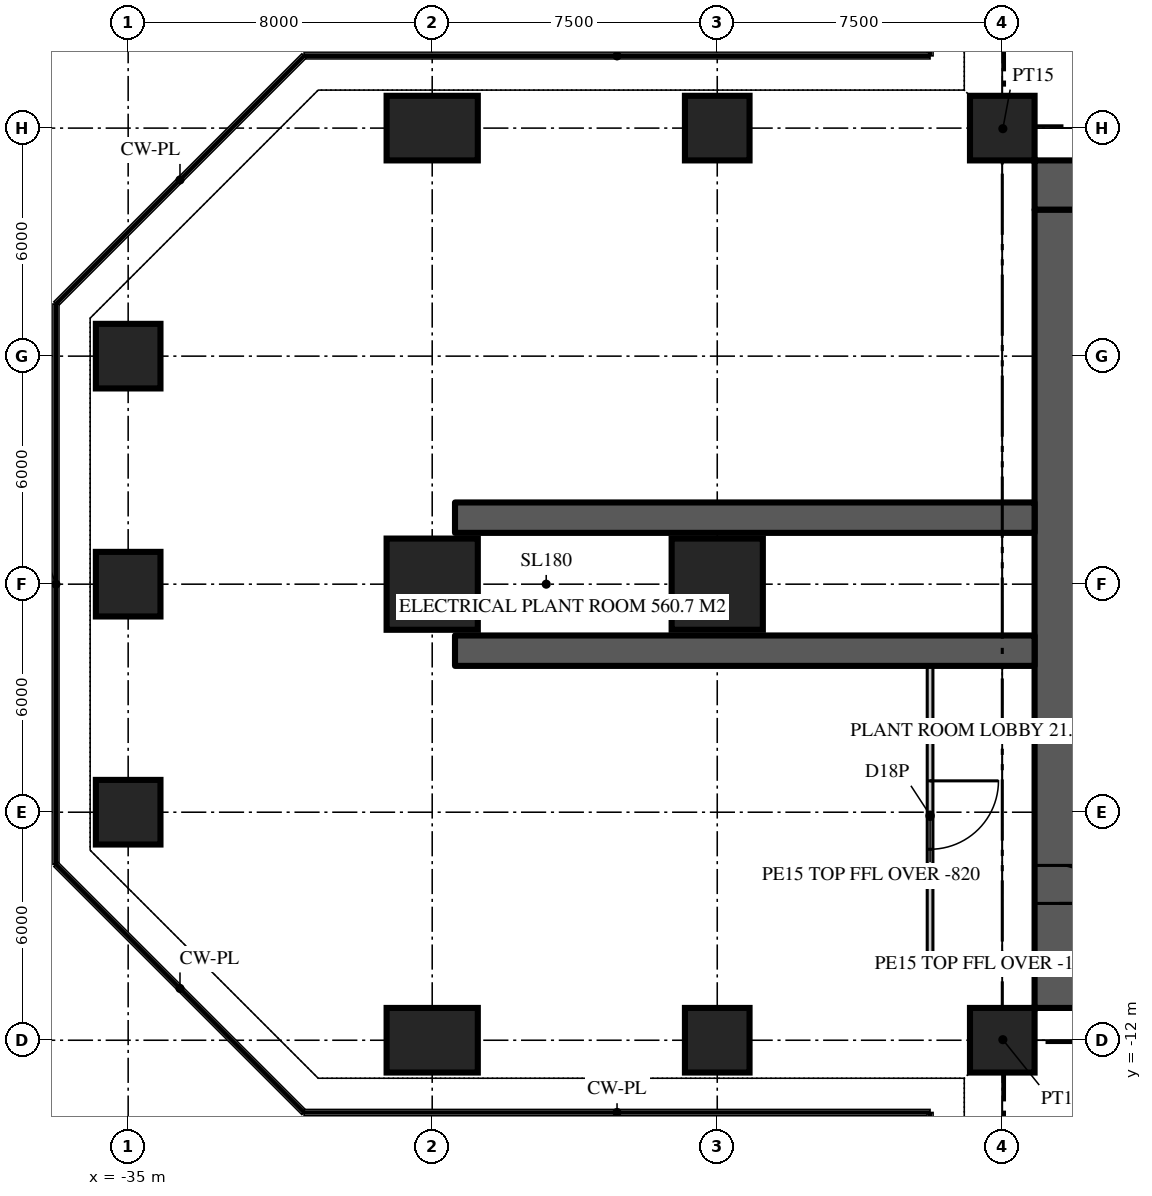
"""IFC4 building model, lengths in metres.
Left out: names, types, materials, properties, quantities, classifications, styles, units other than length and angle.
Written with IfcOpenShell. Run it as: python <this file> out.ifc"""

import sys

from ifc_helpers import new_model, si_unit, direction, frame, frame_2d, origin, origin_2d, place, context, subcontext, project, spatial, rectangle, extrude, element, fill, save


model = new_model("IFC4")
c1 = context("Model", 3, precision=1e-05, world=origin(), true_north=direction((0.0, 1.0)))
c2 = subcontext(c1, "Body", "Model", "MODEL_VIEW")
j1 = project(units=[si_unit("LENGTHUNIT", "METRE"), si_unit("PLANEANGLEUNIT", "RADIAN")], contexts=[c1])
p1 = place(None, origin())
s1 = spatial("IfcSite", under=j1, at=p1, CompositionType="ELEMENT")
p2 = place(p1, origin())
s2 = spatial("IfcBuilding", under=s1, at=p2, CompositionType="ELEMENT")
p3 = place(p2, frame((0.0, 0.0, 118.2)))
s3 = spatial("IfcBuildingStorey", under=s2, at=p3, CompositionType="ELEMENT", Elevation=118.2)
p4 = place(p3, frame((-11.15, 10.5, 0.0), z_axis=(0.0, 0.0, 1.0), x_axis=(1.0, 0.0, 0.0)))
e1 = element("IfcWall", 1, at=p4, inside=s3, PredefinedType="SHEAR", context=c2, shape_type="SweptSolid", body=[
    extrude(rectangle(XDim=22.3, YDim=1.3, at=frame_2d((11.15, 0.0))), origin(), (0.0, 0.0, 1.0), 6.0),
])
p5 = place(p4, frame((4.25, 0.0, 0.0)))
e2 = element("IfcOpeningElement", 2, at=p5, cuts=e1, PredefinedType="OPENING", context=c2, shape_type="SweptSolid", body=[
    extrude(rectangle(XDim=1.8, YDim=2.2, at=frame_2d((0.9, 1.1))), frame((0.0, 0.66, 0.0), z_axis=(0.0, -1.0, 0.0), x_axis=(1.0, 0.0, 0.0)), (0.0, 0.0, 1.0), 1.32),
])
p6 = place(p4, frame((16.25, 0.0, 0.0)))
e3 = element("IfcOpeningElement", 3, at=p6, cuts=e1, PredefinedType="OPENING", context=c2, shape_type="SweptSolid", body=[
    extrude(rectangle(XDim=1.8, YDim=2.2, at=frame_2d((0.9, 1.1))), frame((0.0, 0.66, 0.0), z_axis=(0.0, -1.0, 0.0), x_axis=(1.0, 0.0, 0.0)), (0.0, 0.0, 1.0), 1.32),
])
p7 = place(p3, frame((11.15, -10.5, 0.0), z_axis=(0.0, 0.0, 1.0), x_axis=(-1.0, 0.0, 0.0)))
e4 = element("IfcWall", 4, at=p7, inside=s3, PredefinedType="SHEAR", context=c2, shape_type="SweptSolid", body=[
    extrude(rectangle(XDim=22.3, YDim=1.3, at=frame_2d((11.15, 0.0))), origin(), (0.0, 0.0, 1.0), 6.0),
])
p8 = place(p7, frame((16.25, 0.0, 0.0)))
e5 = element("IfcOpeningElement", 5, at=p8, cuts=e4, PredefinedType="OPENING", context=c2, shape_type="SweptSolid", body=[
    extrude(rectangle(XDim=1.8, YDim=2.2, at=frame_2d((0.9, 1.1))), frame((0.0, 0.66, 0.0), z_axis=(0.0, -1.0, 0.0), x_axis=(1.0, 0.0, 0.0)), (0.0, 0.0, 1.0), 1.32),
])
p9 = place(p7, frame((4.25, 0.0, 0.0)))
e6 = element("IfcOpeningElement", 6, at=p9, cuts=e4, PredefinedType="OPENING", context=c2, shape_type="SweptSolid", body=[
    extrude(rectangle(XDim=1.8, YDim=2.2, at=frame_2d((0.9, 1.1))), frame((0.0, 0.66, 0.0), z_axis=(0.0, -1.0, 0.0), x_axis=(1.0, 0.0, 0.0)), (0.0, 0.0, 1.0), 1.32),
])
p10 = place(p3, frame((-10.5, 9.85, 0.0), z_axis=(0.0, 0.0, 1.0), x_axis=(0.0, -1.0, 0.0)))
e7 = element("IfcWall", 7, at=p10, inside=s3, PredefinedType="SHEAR", context=c2, shape_type="SweptSolid", body=[
    extrude(rectangle(XDim=19.7, YDim=1.3, at=frame_2d((9.85, 0.0))), origin(), (0.0, 0.0, 1.0), 6.0),
])
p11 = place(p10, frame((17.25, 0.0, 0.0)))
e8 = element("IfcOpeningElement", 8, at=p11, cuts=e7, PredefinedType="OPENING", context=c2, shape_type="SweptSolid", body=[
    extrude(rectangle(XDim=1.0, YDim=2.2, at=frame_2d((0.5, 1.1))), frame((0.0, 0.66, 0.0), z_axis=(0.0, -1.0, 0.0), x_axis=(1.0, 0.0, 0.0)), (0.0, 0.0, 1.0), 1.32),
])
for number, where, z_axis, x_axis in (
    (9, (-11.15, 1.75, 0.0), (0.0, 0.0, 1.0), (-1.0, 0.0, 0.0)),
    (10, (-11.15, -1.75, 0.0), (0.0, 0.0, 1.0), (-1.0, 0.0, 0.0)),
):
    element("IfcWall", number, at=place(p3, frame(where, z_axis=z_axis, x_axis=x_axis)), inside=s3, PredefinedType="SHEAR", context=c2, shape_type="SweptSolid", body=[
        extrude(rectangle(XDim=15.25, YDim=0.8, at=frame_2d((7.625, 0.0))), origin(), (0.0, 0.0, 1.0), 6.0),
    ])
p12 = place(p3, frame((-27.0, -12.0, 0.0), z_axis=(0.0, 0.0, 1.0), x_axis=(0.0, 1.0, 0.0)))
e11 = element("IfcColumn", 11, at=p12, inside=s3, PredefinedType="COLUMN", context=c2, shape_type="SweptSolid", body=[
    extrude(rectangle(XDim=1.7, YDim=2.4, at=origin_2d()), origin(), (0.0, 0.0, 1.0), 6.0),
])
for number, where, z_axis, x_axis in (
    (12, (-19.5, -12.0, 0.0), (0.0, 0.0, 1.0), (1.0, 0.0, 0.0)),
    (13, (-12.0, -12.0, 0.0), (0.0, 0.0, 1.0), (1.0, 0.0, 0.0)),
    (14, (-35.0, -6.0, 0.0), (0.0, 0.0, 1.0), (1.0, 0.0, 0.0)),
    (15, (-35.0, 0.0, 0.0), (0.0, 0.0, 1.0), (1.0, 0.0, 0.0)),
):
    element("IfcColumn", number, at=place(p3, frame(where, z_axis=z_axis, x_axis=x_axis)), inside=s3, PredefinedType="COLUMN", context=c2, shape_type="SweptSolid", body=[
        extrude(rectangle(XDim=1.7, YDim=1.7, at=origin_2d()), origin(), (0.0, 0.0, 1.0), 6.0),
    ])
for number, where, z_axis, x_axis in (
    (16, (-27.0, 0.0, 0.0), (0.0, 0.0, 1.0), (1.0, 0.0, 0.0)),
    (17, (-19.5, 0.0, 0.0), (0.0, 0.0, 1.0), (1.0, 0.0, 0.0)),
):
    element("IfcColumn", number, at=place(p3, frame(where, z_axis=z_axis, x_axis=x_axis)), inside=s3, PredefinedType="COLUMN", context=c2, shape_type="SweptSolid", body=[
        extrude(rectangle(XDim=2.4, YDim=2.4, at=origin_2d()), origin(), (0.0, 0.0, 1.0), 6.0),
    ])
p13 = place(p3, frame((-35.0, 6.0, 0.0), z_axis=(0.0, 0.0, 1.0), x_axis=(1.0, 0.0, 0.0)))
e18 = element("IfcColumn", 18, at=p13, inside=s3, PredefinedType="COLUMN", context=c2, shape_type="SweptSolid", body=[
    extrude(rectangle(XDim=1.7, YDim=1.7, at=origin_2d()), origin(), (0.0, 0.0, 1.0), 6.0),
])
p14 = place(p3, frame((-27.0, 12.0, 0.0), z_axis=(0.0, 0.0, 1.0), x_axis=(0.0, 1.0, 0.0)))
e19 = element("IfcColumn", 19, at=p14, inside=s3, PredefinedType="COLUMN", context=c2, shape_type="SweptSolid", body=[
    extrude(rectangle(XDim=1.7, YDim=2.4, at=origin_2d()), origin(), (0.0, 0.0, 1.0), 6.0),
])
for number, where, z_axis, x_axis in (
    (20, (-19.5, 12.0, 0.0), (0.0, 0.0, 1.0), (1.0, 0.0, 0.0)),
    (21, (-12.0, 12.0, 0.0), (0.0, 0.0, 1.0), (1.0, 0.0, 0.0)),
):
    element("IfcColumn", number, at=place(p3, frame(where, z_axis=z_axis, x_axis=x_axis)), inside=s3, PredefinedType="COLUMN", context=c2, shape_type="SweptSolid", body=[
        extrude(rectangle(XDim=1.7, YDim=1.7, at=origin_2d()), origin(), (0.0, 0.0, 1.0), 6.0),
    ])
p15 = place(p3, frame((-13.9, -2.15, 0.0), z_axis=(0.0, 0.0, 1.0), x_axis=(0.0, -1.0, 0.0)))
e22 = element("IfcWall", 22, at=p15, inside=s3, PredefinedType="SOLIDWALL", context=c2, shape_type="SweptSolid", body=[
    extrude(rectangle(XDim=7.925, YDim=0.15, at=frame_2d((3.962, 0.0))), origin(), (0.0, 0.0, 1.0), 5.18),
])
p16 = place(p15, frame((3.025, 0.0, 0.0)))
e23 = element("IfcOpeningElement", 23, at=p16, cuts=e22, PredefinedType="OPENING", context=c2, shape_type="SweptSolid", body=[
    extrude(rectangle(XDim=1.8, YDim=2.4, at=frame_2d((0.9, 1.2))), frame((0.0, 0.085, 0.0), z_axis=(0.0, -1.0, 0.0), x_axis=(1.0, 0.0, 0.0)), (0.0, 0.0, 1.0), 0.17),
])
p17 = place(p3, frame((-11.15, -10.0, 0.0), z_axis=(0.0, 0.0, 1.0), x_axis=(-1.0, 0.0, 0.0)))
e24 = element("IfcWall", 24, at=p17, inside=s3, PredefinedType="SOLIDWALL", context=c2, shape_type="SweptSolid", body=[
    extrude(rectangle(XDim=2.675, YDim=0.15, at=frame_2d((1.337, 0.0))), origin(), (0.0, 0.0, 1.0), 5.87),
])
for number, where, z_axis, x_axis in (
    (25, (-11.15, 11.15, 0.0), (0.0, 0.0, 1.0), (-0.707, 0.707, 0.0)),
    (26, (-11.15, -11.15, 0.0), (0.0, 0.0, 1.0), (-0.707, -0.707, 0.0)),
):
    element("IfcWall", number, at=place(p3, frame(where, z_axis=z_axis, x_axis=x_axis)), inside=s3, PredefinedType="PARTITIONING", context=c2, shape_type="SweptSolid", body=[
        extrude(rectangle(XDim=2.362, YDim=0.15, at=frame_2d((1.181, 0.0))), origin(), (0.0, 0.0, 1.0), 5.32),
    ])
p18 = place(p11, origin())
e27 = element("IfcDoor", 27, at=p18, inside=s3, OperationType="SINGLE_SWING_RIGHT", PredefinedType="DOOR", context=c2, shape_type="SweptSolid", body=[
    extrude(rectangle(XDim=1.0, YDim=2.2, at=frame_2d((0.5, 1.1))), frame((0.0, 0.025, 0.0), z_axis=(0.0, -1.0, 0.0), x_axis=(1.0, 0.0, 0.0)), (0.0, 0.0, 1.0), 0.05),
])
fill(e8, e27)
p19 = place(p16, origin())
e28 = element("IfcDoor", 28, at=p19, inside=s3, OperationType="DOUBLE_DOOR_DOUBLE_SWING", PredefinedType="DOOR", context=c2, shape_type="SweptSolid", body=[
    extrude(rectangle(XDim=1.8, YDim=2.4, at=frame_2d((0.9, 1.2))), frame((0.0, 0.025, 0.0), z_axis=(0.0, -1.0, 0.0), x_axis=(1.0, 0.0, 0.0)), (0.0, 0.0, 1.0), 0.05),
])
fill(e23, e28)
save(model, sys.argv[1])
